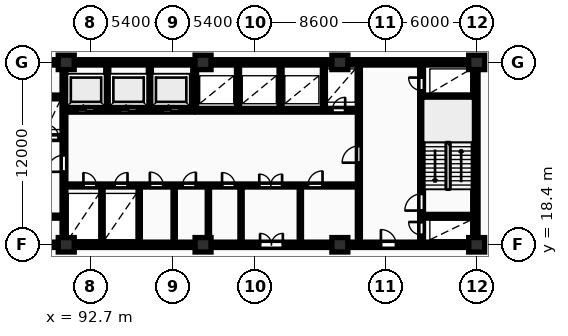
"""IFC4 building model, lengths in metres.
Left out: names, types, materials, properties, quantities, classifications, styles, units other than length and angle.
Written with IfcOpenShell. Run it as: python <this file> out.ifc"""

import sys

from ifc_helpers import new_model, si_unit, direction, frame, frame_2d, origin, origin_2d, place, context, subcontext, project, spatial, rectangle, extrude, element, fill, save


model = new_model("IFC4")
c1 = context("Model", 3, precision=1e-05, world=origin(), true_north=direction((0.0, 1.0)))
c2 = subcontext(c1, "Body", "Model", "MODEL_VIEW")
j1 = project(units=[si_unit("LENGTHUNIT", "METRE"), si_unit("PLANEANGLEUNIT", "RADIAN")], contexts=[c1])
p1 = place(None, origin())
s1 = spatial("IfcSite", under=j1, at=p1, CompositionType="ELEMENT")
p2 = place(p1, origin())
s2 = spatial("IfcBuilding", under=s1, at=p2, CompositionType="ELEMENT")
p3 = place(p2, frame((0.0, 0.0, 14.5)))
s3 = spatial("IfcBuildingStorey", under=s2, at=p3, CompositionType="ELEMENT", Elevation=14.5)
for number, where, z_axis, x_axis in (
    (1, (91.1, 18.4, 0.0), (0.0, 0.0, 1.0), (1.0, 0.0, 0.0)),
    (2, (91.1, 30.4, 0.0), (0.0, 0.0, 1.0), (1.0, 0.0, 0.0)),
    (3, (100.1, 18.4, 0.0), (0.0, 0.0, 1.0), (1.0, 0.0, 0.0)),
    (4, (100.1, 30.4, 0.0), (0.0, 0.0, 1.0), (1.0, 0.0, 0.0)),
    (5, (109.1, 18.4, 0.0), (0.0, 0.0, 1.0), (1.0, 0.0, 0.0)),
    (6, (109.1, 30.4, 0.0), (0.0, 0.0, 1.0), (1.0, 0.0, 0.0)),
    (7, (118.1, 18.4, 0.0), (0.0, 0.0, 1.0), (1.0, 0.0, 0.0)),
    (8, (118.1, 30.4, 0.0), (0.0, 0.0, 1.0), (1.0, 0.0, 0.0)),
):
    element("IfcColumn", number, at=place(p3, frame(where, z_axis=z_axis, x_axis=x_axis)), inside=s3, PredefinedType="COLUMN", context=c2, shape_type="SweptSolid", body=[
        extrude(rectangle(XDim=1.05, YDim=0.95, at=origin_2d()), origin(), (0.0, 0.0, 1.0), 4.5),
    ])
p4 = place(p3, frame((81.925, 30.4, 0.0), z_axis=(0.0, 0.0, 1.0), x_axis=(1.0, 0.0, 0.0)))
e9 = element("IfcWall", 9, at=p4, inside=s3, PredefinedType="SHEAR", context=c2, shape_type="SweptSolid", body=[
    extrude(rectangle(XDim=36.265, YDim=0.35, at=frame_2d((18.132, 0.0))), origin(), (0.0, 0.0, 1.0), 4.5),
])
p5 = place(p3, frame((118.015, 18.575, 0.0), z_axis=(0.0, 0.0, 1.0), x_axis=(0.0, 1.0, 0.0)))
e10 = element("IfcWall", 10, at=p5, inside=s3, PredefinedType="SHEAR", context=c2, shape_type="SweptSolid", body=[
    extrude(rectangle(XDim=11.65, YDim=0.35, at=frame_2d((5.825, 0.0))), origin(), (0.0, 0.0, 1.0), 4.5),
])
p6 = place(p3, frame((81.925, 18.4, 0.0), z_axis=(0.0, 0.0, 1.0), x_axis=(1.0, 0.0, 0.0)))
e11 = element("IfcWall", 11, at=p6, inside=s3, PredefinedType="SHEAR", context=c2, shape_type="SweptSolid", body=[
    extrude(rectangle(XDim=36.265, YDim=0.35, at=frame_2d((18.132, 0.0))), origin(), (0.0, 0.0, 1.0), 4.5),
])
p7 = place(p6, frame((5.895, 0.0, 0.0)))
e12 = element("IfcOpeningElement", 12, at=p7, cuts=e11, PredefinedType="OPENING", context=c2, shape_type="SweptSolid", body=[
    extrude(rectangle(XDim=1.0, YDim=2.15, at=frame_2d((0.5, 1.075))), frame((0.0, 0.185, 0.0), z_axis=(0.0, -1.0, 0.0), x_axis=(1.0, 0.0, 0.0)), (0.0, 0.0, 1.0), 0.37),
])
p8 = place(p6, frame((21.925, 0.0, 0.0)))
e13 = element("IfcOpeningElement", 13, at=p8, cuts=e11, PredefinedType="OPENING", context=c2, shape_type="SweptSolid", body=[
    extrude(rectangle(XDim=1.5, YDim=2.2, at=frame_2d((0.75, 1.1))), frame((0.0, 0.185, 0.0), z_axis=(0.0, -1.0, 0.0), x_axis=(1.0, 0.0, 0.0)), (0.0, 0.0, 1.0), 0.37),
])
p9 = place(p6, frame((29.875, 0.0, 0.0)))
e14 = element("IfcOpeningElement", 14, at=p9, cuts=e11, PredefinedType="OPENING", context=c2, shape_type="SweptSolid", body=[
    extrude(rectangle(XDim=1.0, YDim=2.15, at=frame_2d((0.5, 1.075))), frame((0.0, 0.185, 0.0), z_axis=(0.0, -1.0, 0.0), x_axis=(1.0, 0.0, 0.0)), (0.0, 0.0, 1.0), 0.37),
])
p10 = place(p3, frame((83.0, 28.125, 0.0), z_axis=(0.0, 0.0, 1.0), x_axis=(1.0, 0.0, 0.0)))
e15 = element("IfcWall", 15, at=p10, inside=s3, PredefinedType="SHEAR", context=c2, shape_type="SweptSolid", body=[
    extrude(rectangle(XDim=7.82, YDim=0.25, at=frame_2d((3.91, 0.0))), origin(), (0.0, 0.0, 1.0), 4.5),
])
p11 = place(p3, frame((86.5, 25.45, 0.0), z_axis=(0.0, 0.0, 1.0), x_axis=(1.0, 0.0, 0.0)))
e16 = element("IfcWall", 16, at=p11, inside=s3, PredefinedType="SHEAR", context=c2, shape_type="SweptSolid", body=[
    extrude(rectangle(XDim=4.32, YDim=0.25, at=frame_2d((2.16, 0.0))), origin(), (0.0, 0.0, 1.0), 4.5),
])
p12 = place(p11, frame((1.14, 0.0, 0.0)))
e17 = element("IfcOpeningElement", 17, at=p12, cuts=e16, PredefinedType="OPENING", context=c2, shape_type="SweptSolid", body=[
    extrude(rectangle(XDim=1.12, YDim=2.12, at=frame_2d((0.56, 1.06))), frame((0.0, 0.135, 0.0), z_axis=(0.0, -1.0, 0.0), x_axis=(1.0, 0.0, 0.0)), (0.0, 0.0, 1.0), 0.27),
])
p13 = place(p11, frame((3.25, 0.0, 0.0)))
e18 = element("IfcOpeningElement", 18, at=p13, cuts=e16, PredefinedType="OPENING", context=c2, shape_type="SweptSolid", body=[
    extrude(rectangle(XDim=0.85, YDim=2.05, at=frame_2d((0.425, 1.025))), frame((0.0, 0.135, 0.0), z_axis=(0.0, -1.0, 0.0), x_axis=(1.0, 0.0, 0.0)), (0.0, 0.0, 1.0), 0.27),
])
p14 = place(p3, frame((86.5, 20.25, 0.0), z_axis=(0.0, 0.0, 1.0), x_axis=(1.0, 0.0, 0.0)))
e19 = element("IfcWall", 19, at=p14, inside=s3, PredefinedType="PARTITIONING", context=c2, shape_type="SweptSolid", body=[
    extrude(rectangle(XDim=4.32, YDim=0.2, at=frame_2d((2.16, 0.0))), origin(), (0.0, 0.0, 1.0), 4.18),
])
p15 = place(p14, frame((1.4, 0.0, 0.0)))
e20 = element("IfcOpeningElement", 20, at=p15, cuts=e19, PredefinedType="OPENING", context=c2, shape_type="SweptSolid", body=[
    extrude(rectangle(XDim=1.1, YDim=2.1, at=frame_2d((0.55, 1.05))), frame((0.0, 0.11, 0.0), z_axis=(0.0, -1.0, 0.0), x_axis=(1.0, 0.0, 0.0)), (0.0, 0.0, 1.0), 0.22),
])
p16 = place(p3, frame((90.95, 18.6, 0.0), z_axis=(0.0, 0.0, 1.0), x_axis=(0.0, 1.0, 0.0)))
e21 = element("IfcWall", 21, at=p16, inside=s3, PredefinedType="SHEAR", context=c2, shape_type="SweptSolid", body=[
    extrude(rectangle(XDim=11.6, YDim=0.25, at=frame_2d((5.8, 0.0))), origin(), (0.0, 0.0, 1.0), 4.5),
])
p17 = place(p16, frame((4.6, 0.0, 0.0)))
e22 = element("IfcOpeningElement", 22, at=p17, cuts=e21, PredefinedType="OPENING", context=c2, shape_type="SweptSolid", body=[
    extrude(rectangle(XDim=1.1, YDim=2.1, at=frame_2d((0.55, 1.05))), frame((0.0, 0.135, 0.0), z_axis=(0.0, -1.0, 0.0), x_axis=(1.0, 0.0, 0.0)), (0.0, 0.0, 1.0), 0.27),
])
for number, where, z_axis, x_axis in (
    (23, (93.8, 27.38, 0.0), (0.0, 0.0, 1.0), (0.0, 1.0, 0.0)),
    (24, (96.6, 27.38, 0.0), (0.0, 0.0, 1.0), (0.0, 1.0, 0.0)),
):
    element("IfcWall", number, at=place(p3, frame(where, z_axis=z_axis, x_axis=x_axis)), inside=s3, PredefinedType="PARTITIONING", context=c2, shape_type="SweptSolid", body=[
        extrude(rectangle(XDim=2.82, YDim=0.2, at=frame_2d((1.41, 0.0))), origin(), (0.0, 0.0, 1.0), 4.18),
    ])
p18 = place(p3, frame((91.08, 27.25, 0.0), z_axis=(0.0, 0.0, 1.0), x_axis=(1.0, 0.0, 0.0)))
e25 = element("IfcWall", 25, at=p18, inside=s3, PredefinedType="SHEAR", context=c2, shape_type="SweptSolid", body=[
    extrude(rectangle(XDim=8.34, YDim=0.25, at=frame_2d((4.17, 0.0))), origin(), (0.0, 0.0, 1.0), 4.5),
])
p19 = place(p18, frame((0.76, 0.0, 0.0)))
e26 = element("IfcOpeningElement", 26, at=p19, cuts=e25, PredefinedType="OPENING", context=c2, shape_type="SweptSolid", body=[
    extrude(rectangle(XDim=1.12, YDim=2.12, at=frame_2d((0.56, 1.06))), frame((0.0, 0.135, 0.0), z_axis=(0.0, -1.0, 0.0), x_axis=(1.0, 0.0, 0.0)), (0.0, 0.0, 1.0), 0.27),
])
p20 = place(p18, frame((3.56, 0.0, 0.0)))
e27 = element("IfcOpeningElement", 27, at=p20, cuts=e25, PredefinedType="OPENING", context=c2, shape_type="SweptSolid", body=[
    extrude(rectangle(XDim=1.12, YDim=2.12, at=frame_2d((0.56, 1.06))), frame((0.0, 0.135, 0.0), z_axis=(0.0, -1.0, 0.0), x_axis=(1.0, 0.0, 0.0)), (0.0, 0.0, 1.0), 0.27),
])
p21 = place(p18, frame((6.36, 0.0, 0.0)))
e28 = element("IfcOpeningElement", 28, at=p21, cuts=e25, PredefinedType="OPENING", context=c2, shape_type="SweptSolid", body=[
    extrude(rectangle(XDim=1.12, YDim=2.12, at=frame_2d((0.56, 1.06))), frame((0.0, 0.135, 0.0), z_axis=(0.0, -1.0, 0.0), x_axis=(1.0, 0.0, 0.0)), (0.0, 0.0, 1.0), 0.27),
])
p22 = place(p3, frame((99.55, 27.25, 0.0), z_axis=(0.0, 0.0, 1.0), x_axis=(0.0, 1.0, 0.0)))
e29 = element("IfcWall", 29, at=p22, inside=s3, PredefinedType="SHEAR", context=c2, shape_type="SweptSolid", body=[
    extrude(rectangle(XDim=2.95, YDim=0.25, at=frame_2d((1.475, 0.0))), origin(), (0.0, 0.0, 1.0), 4.5),
])
for number, where, z_axis, x_axis in (
    (30, (102.4, 27.38, 0.0), (0.0, 0.0, 1.0), (0.0, 1.0, 0.0)),
    (31, (105.2, 27.38, 0.0), (0.0, 0.0, 1.0), (0.0, 1.0, 0.0)),
    (32, (108.05, 27.38, 0.0), (0.0, 0.0, 1.0), (0.0, 1.0, 0.0)),
):
    element("IfcWall", number, at=place(p3, frame(where, z_axis=z_axis, x_axis=x_axis)), inside=s3, PredefinedType="PARTITIONING", context=c2, shape_type="SweptSolid", body=[
        extrude(rectangle(XDim=2.82, YDim=0.2, at=frame_2d((1.41, 0.0))), origin(), (0.0, 0.0, 1.0), 4.18),
    ])
p23 = place(p3, frame((99.68, 27.25, 0.0), z_axis=(0.0, 0.0, 1.0), x_axis=(1.0, 0.0, 0.0)))
e33 = element("IfcWall", 33, at=p23, inside=s3, PredefinedType="SHEAR", context=c2, shape_type="SweptSolid", body=[
    extrude(rectangle(XDim=10.54, YDim=0.25, at=frame_2d((5.27, 0.0))), origin(), (0.0, 0.0, 1.0), 4.5),
])
p24 = place(p23, frame((8.92, 0.0, 0.0)))
e34 = element("IfcOpeningElement", 34, at=p24, cuts=e33, PredefinedType="OPENING", context=c2, shape_type="SweptSolid", body=[
    extrude(rectangle(XDim=0.85, YDim=2.05, at=frame_2d((0.425, 1.025))), frame((0.0, 0.135, 0.0), z_axis=(0.0, -1.0, 0.0), x_axis=(1.0, 0.0, 0.0)), (0.0, 0.0, 1.0), 0.27),
])
for number, where, z_axis, x_axis in (
    (35, (93.45, 18.6, 0.0), (0.0, 0.0, 1.0), (0.0, 1.0, 0.0)),
    (36, (95.9, 18.6, 0.0), (0.0, 0.0, 1.0), (0.0, 1.0, 0.0)),
    (37, (98.2, 18.6, 0.0), (0.0, 0.0, 1.0), (0.0, 1.0, 0.0)),
):
    element("IfcWall", number, at=place(p3, frame(where, z_axis=z_axis, x_axis=x_axis)), inside=s3, PredefinedType="PARTITIONING", context=c2, shape_type="SweptSolid", body=[
        extrude(rectangle(XDim=3.6, YDim=0.15, at=frame_2d((1.8, 0.0))), origin(), (0.0, 0.0, 1.0), 4.18),
    ])
p25 = place(p3, frame((100.45, 18.6, 0.0), z_axis=(0.0, 0.0, 1.0), x_axis=(0.0, 1.0, 0.0)))
e38 = element("IfcWall", 38, at=p25, inside=s3, PredefinedType="PARTITIONING", context=c2, shape_type="SweptSolid", body=[
    extrude(rectangle(XDim=3.6, YDim=0.15, at=frame_2d((1.8, 0.0))), origin(), (0.0, 0.0, 1.0), 3.43),
])
for number, where, z_axis, x_axis in (
    (39, (102.6, 18.6, 0.0), (0.0, 0.0, 1.0), (0.0, 1.0, 0.0)),
    (40, (106.5, 18.6, 0.0), (0.0, 0.0, 1.0), (0.0, 1.0, 0.0)),
):
    element("IfcWall", number, at=place(p3, frame(where, z_axis=z_axis, x_axis=x_axis)), inside=s3, PredefinedType="PARTITIONING", context=c2, shape_type="SweptSolid", body=[
        extrude(rectangle(XDim=3.6, YDim=0.15, at=frame_2d((1.8, 0.0))), origin(), (0.0, 0.0, 1.0), 4.18),
    ])
p26 = place(p3, frame((91.08, 22.3, 0.0), z_axis=(0.0, 0.0, 1.0), x_axis=(1.0, 0.0, 0.0)))
e41 = element("IfcWall", 41, at=p26, inside=s3, PredefinedType="PARTITIONING", context=c2, shape_type="SweptSolid", body=[
    extrude(rectangle(XDim=19.14, YDim=0.2, at=frame_2d((9.57, 0.0))), origin(), (0.0, 0.0, 1.0), 4.18),
])
p27 = place(p26, frame((1.15, 0.0, 0.0)))
e42 = element("IfcOpeningElement", 42, at=p27, cuts=e41, PredefinedType="OPENING", context=c2, shape_type="SweptSolid", body=[
    extrude(rectangle(XDim=0.85, YDim=2.05, at=frame_2d((0.425, 1.025))), frame((0.0, 0.11, 0.0), z_axis=(0.0, -1.0, 0.0), x_axis=(1.0, 0.0, 0.0)), (0.0, 0.0, 1.0), 0.22),
])
p28 = place(p26, frame((3.2, 0.0, 0.0)))
e43 = element("IfcOpeningElement", 43, at=p28, cuts=e41, PredefinedType="OPENING", context=c2, shape_type="SweptSolid", body=[
    extrude(rectangle(XDim=0.85, YDim=2.05, at=frame_2d((0.425, 1.025))), frame((0.0, 0.11, 0.0), z_axis=(0.0, -1.0, 0.0), x_axis=(1.0, 0.0, 0.0)), (0.0, 0.0, 1.0), 0.22),
])
p29 = place(p26, frame((12.72, 0.0, 0.0)))
e44 = element("IfcOpeningElement", 44, at=p29, cuts=e41, PredefinedType="OPENING", context=c2, shape_type="SweptSolid", body=[
    extrude(rectangle(XDim=1.5, YDim=2.2, at=frame_2d((0.75, 1.1))), frame((0.0, 0.11, 0.0), z_axis=(0.0, -1.0, 0.0), x_axis=(1.0, 0.0, 0.0)), (0.0, 0.0, 1.0), 0.22),
])
p30 = place(p26, frame((5.52, 0.0, 0.0)))
e45 = element("IfcOpeningElement", 45, at=p30, cuts=e41, PredefinedType="OPENING", context=c2, shape_type="SweptSolid", body=[
    extrude(rectangle(XDim=0.88, YDim=2.06, at=frame_2d((0.44, 1.03))), frame((0.0, 0.11, 0.0), z_axis=(0.0, -1.0, 0.0), x_axis=(1.0, 0.0, 0.0)), (0.0, 0.0, 1.0), 0.22),
])
p31 = place(p26, frame((7.67, 0.0, 0.0)))
e46 = element("IfcOpeningElement", 46, at=p31, cuts=e41, PredefinedType="OPENING", context=c2, shape_type="SweptSolid", body=[
    extrude(rectangle(XDim=0.88, YDim=2.06, at=frame_2d((0.44, 1.03))), frame((0.0, 0.11, 0.0), z_axis=(0.0, -1.0, 0.0), x_axis=(1.0, 0.0, 0.0)), (0.0, 0.0, 1.0), 0.22),
])
p32 = place(p26, frame((10.27, 0.0, 0.0)))
e47 = element("IfcOpeningElement", 47, at=p32, cuts=e41, PredefinedType="OPENING", context=c2, shape_type="SweptSolid", body=[
    extrude(rectangle(XDim=0.85, YDim=2.05, at=frame_2d((0.425, 1.025))), frame((0.0, 0.11, 0.0), z_axis=(0.0, -1.0, 0.0), x_axis=(1.0, 0.0, 0.0)), (0.0, 0.0, 1.0), 0.22),
])
p33 = place(p26, frame((15.92, 0.0, 0.0)))
e48 = element("IfcOpeningElement", 48, at=p33, cuts=e41, PredefinedType="OPENING", context=c2, shape_type="SweptSolid", body=[
    extrude(rectangle(XDim=0.96, YDim=2.1, at=frame_2d((0.48, 1.05))), frame((0.0, 0.11, 0.0), z_axis=(0.0, -1.0, 0.0), x_axis=(1.0, 0.0, 0.0)), (0.0, 0.0, 1.0), 0.22),
])
p34 = place(p3, frame((110.35, 18.6, 0.0), z_axis=(0.0, 0.0, 1.0), x_axis=(0.0, 1.0, 0.0)))
e49 = element("IfcWall", 49, at=p34, inside=s3, PredefinedType="PARTITIONING", context=c2, shape_type="SweptSolid", body=[
    extrude(rectangle(XDim=11.6, YDim=0.2, at=frame_2d((5.8, 0.0))), origin(), (0.0, 0.0, 1.0), 4.18),
])
p35 = place(p34, frame((5.2, 0.0, 0.0)))
e50 = element("IfcOpeningElement", 50, at=p35, cuts=e49, PredefinedType="OPENING", context=c2, shape_type="SweptSolid", body=[
    extrude(rectangle(XDim=1.1, YDim=2.15, at=frame_2d((0.55, 1.075))), frame((0.0, 0.11, 0.0), z_axis=(0.0, -1.0, 0.0), x_axis=(1.0, 0.0, 0.0)), (0.0, 0.0, 1.0), 0.22),
])
p36 = place(p3, frame((114.475, 18.6, 0.0), z_axis=(0.0, 0.0, 1.0), x_axis=(0.0, 1.0, 0.0)))
e51 = element("IfcWall", 51, at=p36, inside=s3, PredefinedType="SHEAR", context=c2, shape_type="SweptSolid", body=[
    extrude(rectangle(XDim=11.6, YDim=0.25, at=frame_2d((5.8, 0.0))), origin(), (0.0, 0.0, 1.0), 4.5),
])
p37 = place(p36, frame((0.45, 0.0, 0.0)))
e52 = element("IfcOpeningElement", 52, at=p37, cuts=e51, PredefinedType="OPENING", context=c2, shape_type="SweptSolid", body=[
    extrude(rectangle(XDim=0.85, YDim=2.05, at=frame_2d((0.425, 1.025))), frame((0.0, 0.135, 0.0), z_axis=(0.0, -1.0, 0.0), x_axis=(1.0, 0.0, 0.0)), (0.0, 0.0, 1.0), 0.27),
])
p38 = place(p36, frame((2.05, 0.0, 0.0)))
e53 = element("IfcOpeningElement", 53, at=p38, cuts=e51, PredefinedType="OPENING", context=c2, shape_type="SweptSolid", body=[
    extrude(rectangle(XDim=1.1, YDim=2.1, at=frame_2d((0.55, 1.05))), frame((0.0, 0.135, 0.0), z_axis=(0.0, -1.0, 0.0), x_axis=(1.0, 0.0, 0.0)), (0.0, 0.0, 1.0), 0.27),
])
p39 = place(p36, frame((9.95, 0.0, 0.0)))
e54 = element("IfcOpeningElement", 54, at=p39, cuts=e51, PredefinedType="OPENING", context=c2, shape_type="SweptSolid", body=[
    extrude(rectangle(XDim=0.85, YDim=2.05, at=frame_2d((0.425, 1.025))), frame((0.0, 0.135, 0.0), z_axis=(0.0, -1.0, 0.0), x_axis=(1.0, 0.0, 0.0)), (0.0, 0.0, 1.0), 0.27),
])
for number, where, z_axis, x_axis in (
    (55, (114.6, 20.275, 0.0), (0.0, 0.0, 1.0), (1.0, 0.0, 0.0)),
    (56, (114.6, 28.125, 0.0), (0.0, 0.0, 1.0), (1.0, 0.0, 0.0)),
):
    element("IfcWall", number, at=place(p3, frame(where, z_axis=z_axis, x_axis=x_axis)), inside=s3, PredefinedType="SHEAR", context=c2, shape_type="SweptSolid", body=[
        extrude(rectangle(XDim=3.24, YDim=0.25, at=frame_2d((1.62, 0.0))), origin(), (0.0, 0.0, 1.0), 4.5),
    ])
p40 = place(p8, origin())
e57 = element("IfcDoor", 57, at=p40, inside=s3, OperationType="DOUBLE_DOOR_SINGLE_SWING", PredefinedType="DOOR", context=c2, shape_type="SweptSolid", body=[
    extrude(rectangle(XDim=1.5, YDim=2.2, at=frame_2d((0.75, 1.1))), frame((0.0, 0.025, 0.0), z_axis=(0.0, -1.0, 0.0), x_axis=(1.0, 0.0, 0.0)), (0.0, 0.0, 1.0), 0.05),
])
fill(e13, e57)
p41 = place(p9, origin())
e58 = element("IfcDoor", 58, at=p41, inside=s3, OperationType="SINGLE_SWING_LEFT", PredefinedType="DOOR", context=c2, shape_type="SweptSolid", body=[
    extrude(rectangle(XDim=1.0, YDim=2.15, at=frame_2d((0.5, 1.075))), frame((0.0, 0.025, 0.0), z_axis=(0.0, -1.0, 0.0), x_axis=(1.0, 0.0, 0.0)), (0.0, 0.0, 1.0), 0.05),
])
fill(e14, e58)
p42 = place(p13, origin())
e59 = element("IfcDoor", 59, at=p42, inside=s3, OperationType="SINGLE_SWING_LEFT", PredefinedType="DOOR", context=c2, shape_type="SweptSolid", body=[
    extrude(rectangle(XDim=0.85, YDim=2.05, at=frame_2d((0.425, 1.025))), frame((0.0, 0.025, 0.0), z_axis=(0.0, -1.0, 0.0), x_axis=(1.0, 0.0, 0.0)), (0.0, 0.0, 1.0), 0.05),
])
fill(e18, e59)
p43 = place(p17, origin())
e60 = element("IfcDoor", 60, at=p43, inside=s3, OperationType="SINGLE_SWING_LEFT", PredefinedType="DOOR", context=c2, shape_type="SweptSolid", body=[
    extrude(rectangle(XDim=1.1, YDim=2.1, at=frame_2d((0.55, 1.05))), frame((0.0, 0.025, 0.0), z_axis=(0.0, -1.0, 0.0), x_axis=(1.0, 0.0, 0.0)), (0.0, 0.0, 1.0), 0.05),
])
fill(e22, e60)
p44 = place(p19, origin())
e61 = element("IfcDoor", 61, at=p44, inside=s3, OperationType="SLIDING_TO_LEFT", PredefinedType="DOOR", context=c2, shape_type="SweptSolid", body=[
    extrude(rectangle(XDim=1.12, YDim=2.12, at=frame_2d((0.56, 1.06))), frame((0.0, 0.025, 0.0), z_axis=(0.0, -1.0, 0.0), x_axis=(1.0, 0.0, 0.0)), (0.0, 0.0, 1.0), 0.05),
])
fill(e26, e61)
p45 = place(p20, origin())
e62 = element("IfcDoor", 62, at=p45, inside=s3, OperationType="SLIDING_TO_LEFT", PredefinedType="DOOR", context=c2, shape_type="SweptSolid", body=[
    extrude(rectangle(XDim=1.12, YDim=2.12, at=frame_2d((0.56, 1.06))), frame((0.0, 0.025, 0.0), z_axis=(0.0, -1.0, 0.0), x_axis=(1.0, 0.0, 0.0)), (0.0, 0.0, 1.0), 0.05),
])
fill(e27, e62)
p46 = place(p21, origin())
e63 = element("IfcDoor", 63, at=p46, inside=s3, OperationType="SLIDING_TO_LEFT", PredefinedType="DOOR", context=c2, shape_type="SweptSolid", body=[
    extrude(rectangle(XDim=1.12, YDim=2.12, at=frame_2d((0.56, 1.06))), frame((0.0, 0.025, 0.0), z_axis=(0.0, -1.0, 0.0), x_axis=(1.0, 0.0, 0.0)), (0.0, 0.0, 1.0), 0.05),
])
fill(e28, e63)
p47 = place(p24, origin())
e64 = element("IfcDoor", 64, at=p47, inside=s3, OperationType="SINGLE_SWING_RIGHT", PredefinedType="DOOR", context=c2, shape_type="SweptSolid", body=[
    extrude(rectangle(XDim=0.85, YDim=2.05, at=frame_2d((0.425, 1.025))), frame((0.0, 0.025, 0.0), z_axis=(0.0, -1.0, 0.0), x_axis=(1.0, 0.0, 0.0)), (0.0, 0.0, 1.0), 0.05),
])
fill(e34, e64)
p48 = place(p27, origin())
e65 = element("IfcDoor", 65, at=p48, inside=s3, OperationType="SINGLE_SWING_LEFT", PredefinedType="DOOR", context=c2, shape_type="SweptSolid", body=[
    extrude(rectangle(XDim=0.85, YDim=2.05, at=frame_2d((0.425, 1.025))), frame((0.0, 0.025, 0.0), z_axis=(0.0, -1.0, 0.0), x_axis=(1.0, 0.0, 0.0)), (0.0, 0.0, 1.0), 0.05),
])
fill(e42, e65)
p49 = place(p28, origin())
e66 = element("IfcDoor", 66, at=p49, inside=s3, OperationType="SINGLE_SWING_RIGHT", PredefinedType="DOOR", context=c2, shape_type="SweptSolid", body=[
    extrude(rectangle(XDim=0.85, YDim=2.05, at=frame_2d((0.425, 1.025))), frame((0.0, 0.025, 0.0), z_axis=(0.0, -1.0, 0.0), x_axis=(1.0, 0.0, 0.0)), (0.0, 0.0, 1.0), 0.05),
])
fill(e43, e66)
p50 = place(p29, origin())
e67 = element("IfcDoor", 67, at=p50, inside=s3, OperationType="DOUBLE_DOOR_SINGLE_SWING", PredefinedType="DOOR", context=c2, shape_type="SweptSolid", body=[
    extrude(rectangle(XDim=1.5, YDim=2.2, at=frame_2d((0.75, 1.1))), frame((0.0, 0.025, 0.0), z_axis=(0.0, -1.0, 0.0), x_axis=(1.0, 0.0, 0.0)), (0.0, 0.0, 1.0), 0.05),
])
fill(e44, e67)
p51 = place(p30, origin())
e68 = element("IfcDoor", 68, at=p51, inside=s3, OperationType="SINGLE_SWING_LEFT", PredefinedType="DOOR", context=c2, shape_type="SweptSolid", body=[
    extrude(rectangle(XDim=0.88, YDim=2.06, at=frame_2d((0.44, 1.03))), frame((0.0, 0.025, 0.0), z_axis=(0.0, -1.0, 0.0), x_axis=(1.0, 0.0, 0.0)), (0.0, 0.0, 1.0), 0.05),
])
fill(e45, e68)
p52 = place(p31, origin())
e69 = element("IfcDoor", 69, at=p52, inside=s3, OperationType="SINGLE_SWING_RIGHT", PredefinedType="DOOR", context=c2, shape_type="SweptSolid", body=[
    extrude(rectangle(XDim=0.88, YDim=2.06, at=frame_2d((0.44, 1.03))), frame((0.0, 0.025, 0.0), z_axis=(0.0, -1.0, 0.0), x_axis=(1.0, 0.0, 0.0)), (0.0, 0.0, 1.0), 0.05),
])
fill(e46, e69)
p53 = place(p32, origin())
e70 = element("IfcDoor", 70, at=p53, inside=s3, OperationType="SINGLE_SWING_LEFT", PredefinedType="DOOR", context=c2, shape_type="SweptSolid", body=[
    extrude(rectangle(XDim=0.85, YDim=2.05, at=frame_2d((0.425, 1.025))), frame((0.0, 0.025, 0.0), z_axis=(0.0, -1.0, 0.0), x_axis=(1.0, 0.0, 0.0)), (0.0, 0.0, 1.0), 0.05),
])
fill(e47, e70)
p54 = place(p33, origin())
e71 = element("IfcDoor", 71, at=p54, inside=s3, OperationType="SINGLE_SWING_RIGHT", PredefinedType="DOOR", context=c2, shape_type="SweptSolid", body=[
    extrude(rectangle(XDim=0.96, YDim=2.1, at=frame_2d((0.48, 1.05))), frame((0.0, 0.025, 0.0), z_axis=(0.0, -1.0, 0.0), x_axis=(1.0, 0.0, 0.0)), (0.0, 0.0, 1.0), 0.05),
])
fill(e48, e71)
p55 = place(p35, origin())
e72 = element("IfcDoor", 72, at=p55, inside=s3, OperationType="SINGLE_SWING_LEFT", PredefinedType="DOOR", context=c2, shape_type="SweptSolid", body=[
    extrude(rectangle(XDim=1.1, YDim=2.15, at=frame_2d((0.55, 1.075))), frame((0.0, 0.025, 0.0), z_axis=(0.0, -1.0, 0.0), x_axis=(1.0, 0.0, 0.0)), (0.0, 0.0, 1.0), 0.05),
])
fill(e50, e72)
p56 = place(p37, origin())
e73 = element("IfcDoor", 73, at=p56, inside=s3, OperationType="SINGLE_SWING_RIGHT", PredefinedType="DOOR", context=c2, shape_type="SweptSolid", body=[
    extrude(rectangle(XDim=0.85, YDim=2.05, at=frame_2d((0.425, 1.025))), frame((0.0, 0.025, 0.0), z_axis=(0.0, -1.0, 0.0), x_axis=(1.0, 0.0, 0.0)), (0.0, 0.0, 1.0), 0.05),
])
fill(e52, e73)
p57 = place(p38, origin())
e74 = element("IfcDoor", 74, at=p57, inside=s3, OperationType="SINGLE_SWING_LEFT", PredefinedType="DOOR", context=c2, shape_type="SweptSolid", body=[
    extrude(rectangle(XDim=1.1, YDim=2.1, at=frame_2d((0.55, 1.05))), frame((0.0, 0.025, 0.0), z_axis=(0.0, -1.0, 0.0), x_axis=(1.0, 0.0, 0.0)), (0.0, 0.0, 1.0), 0.05),
])
fill(e53, e74)
p58 = place(p39, origin())
e75 = element("IfcDoor", 75, at=p58, inside=s3, OperationType="SINGLE_SWING_RIGHT", PredefinedType="DOOR", context=c2, shape_type="SweptSolid", body=[
    extrude(rectangle(XDim=0.85, YDim=2.05, at=frame_2d((0.425, 1.025))), frame((0.0, 0.025, 0.0), z_axis=(0.0, -1.0, 0.0), x_axis=(1.0, 0.0, 0.0)), (0.0, 0.0, 1.0), 0.05),
])
fill(e54, e75)
save(model, sys.argv[1])
